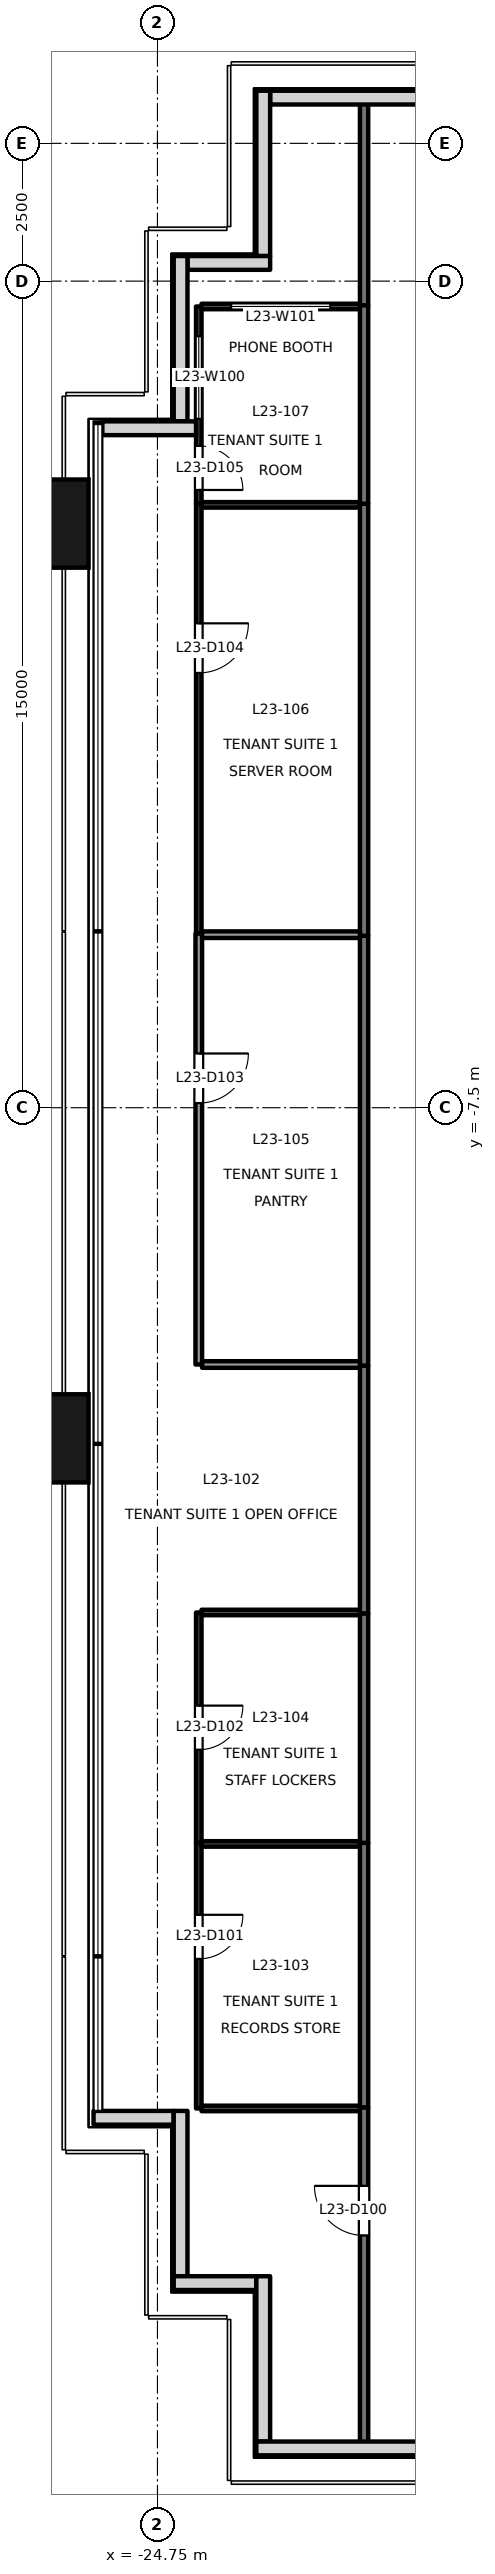
"""IFC4 building model, lengths in metres.
Left out: names, types, materials, properties, quantities, classifications, styles, units other than length and angle.
Written with IfcOpenShell. Run it as: python <this file> out.ifc"""

import sys

from ifc_helpers import new_model, si_unit, direction, frame, frame_2d, origin, origin_2d, place, context, subcontext, project, spatial, rectangle, extrude, element, fill, save


model = new_model("IFC4")
c1 = context("Model", 3, precision=1e-05, world=origin(), true_north=direction((0.0, 1.0)))
c2 = subcontext(c1, "Body", "Model", "MODEL_VIEW")
j1 = project(units=[si_unit("LENGTHUNIT", "METRE"), si_unit("PLANEANGLEUNIT", "RADIAN")], contexts=[c1])
p1 = place(None, origin())
s1 = spatial("IfcSite", under=j1, at=p1, CompositionType="ELEMENT")
p2 = place(p1, origin())
s2 = spatial("IfcBuilding", under=s1, at=p2, CompositionType="ELEMENT")
p3 = place(p2, frame((0.0, 0.0, 103.7)))
s3 = spatial("IfcBuildingStorey", under=s2, at=p3, CompositionType="ELEMENT", Elevation=103.7)
for number, where, z_axis, x_axis in (
    (1, (-26.9, -13.5, -0.2), (0.0, 0.0, 1.0), (0.0, 1.0, 0.0)),
    (2, (-26.9, 3.1, -0.2), (0.0, 0.0, 1.0), (0.0, 1.0, 0.0)),
):
    element("IfcColumn", number, at=place(p3, frame(where, z_axis=z_axis, x_axis=x_axis)), inside=s3, PredefinedType="COLUMN", context=c2, shape_type="SweptSolid", body=[
        extrude(rectangle(XDim=1.6, YDim=1.8, at=origin_2d()), origin(), (0.0, 0.0, 1.0), 4.0),
    ])
p4 = place(p3, frame((-20.0, 10.83, 0.0), z_axis=(0.0, 0.0, 1.0), x_axis=(-1.0, 0.0, 0.0)))
e3 = element("IfcWall", 3, at=p4, inside=s3, PredefinedType="SOLIDWALL", context=c2, shape_type="SweptSolid", body=[
    extrude(rectangle(XDim=2.705, YDim=0.25, at=frame_2d((1.353, 0.0))), origin(), (0.0, 0.0, 1.0), 3.8),
])
p5 = place(p3, frame((-22.83, 10.955, 0.0), z_axis=(0.0, 0.0, 1.0), x_axis=(0.0, -1.0, 0.0)))
e4 = element("IfcWall", 4, at=p5, inside=s3, PredefinedType="SOLIDWALL", context=c2, shape_type="SweptSolid", body=[
    extrude(rectangle(XDim=3.0, YDim=0.25, at=frame_2d((1.5, 0.0))), origin(), (0.0, 0.0, 1.0), 3.8),
])
p6 = place(p3, frame((-22.705, 7.83, 0.0), z_axis=(0.0, 0.0, 1.0), x_axis=(-1.0, 0.0, 0.0)))
e5 = element("IfcWall", 5, at=p6, inside=s3, PredefinedType="SOLIDWALL", context=c2, shape_type="SweptSolid", body=[
    extrude(rectangle(XDim=1.5, YDim=0.25, at=frame_2d((0.75, 0.0))), origin(), (0.0, 0.0, 1.0), 3.8),
])
p7 = place(p3, frame((-24.33, 7.955, 0.0), z_axis=(0.0, 0.0, 1.0), x_axis=(0.0, -1.0, 0.0)))
e6 = element("IfcWall", 6, at=p7, inside=s3, PredefinedType="SOLIDWALL", context=c2, shape_type="SweptSolid", body=[
    extrude(rectangle(XDim=3.0, YDim=0.25, at=frame_2d((1.5, 0.0))), origin(), (0.0, 0.0, 1.0), 3.8),
])
p8 = place(p3, frame((-24.05, 4.83, 0.0), z_axis=(0.0, 0.0, 1.0), x_axis=(-1.0, 0.0, 0.0)))
e7 = element("IfcWall", 7, at=p8, inside=s3, PredefinedType="SOLIDWALL", context=c2, shape_type="SweptSolid", body=[
    extrude(rectangle(XDim=1.7, YDim=0.25, at=frame_2d((0.85, 0.0))), origin(), (0.0, 0.0, 1.0), 3.8),
])
p9 = place(p3, frame((-25.91, -25.83, 0.0), z_axis=(0.0, 0.0, 1.0), x_axis=(1.0, 0.0, 0.0)))
e8 = element("IfcWall", 8, at=p9, inside=s3, PredefinedType="SOLIDWALL", context=c2, shape_type="SweptSolid", body=[
    extrude(rectangle(XDim=1.455, YDim=0.25, at=frame_2d((0.728, 0.0))), origin(), (0.0, 0.0, 1.0), 3.8),
])
p10 = place(p3, frame((-24.33, -25.705, 0.0), z_axis=(0.0, 0.0, 1.0), x_axis=(0.0, -1.0, 0.0)))
e9 = element("IfcWall", 9, at=p10, inside=s3, PredefinedType="SOLIDWALL", context=c2, shape_type="SweptSolid", body=[
    extrude(rectangle(XDim=3.0, YDim=0.25, at=frame_2d((1.5, 0.0))), origin(), (0.0, 0.0, 1.0), 3.8),
])
p11 = place(p3, frame((-24.455, -28.83, 0.0), z_axis=(0.0, 0.0, 1.0), x_axis=(1.0, 0.0, 0.0)))
e10 = element("IfcWall", 10, at=p11, inside=s3, PredefinedType="SOLIDWALL", context=c2, shape_type="SweptSolid", body=[
    extrude(rectangle(XDim=1.5, YDim=0.25, at=frame_2d((0.75, 0.0))), origin(), (0.0, 0.0, 1.0), 3.8),
])
p12 = place(p3, frame((-22.83, -28.705, 0.0), z_axis=(0.0, 0.0, 1.0), x_axis=(0.0, -1.0, 0.0)))
e11 = element("IfcWall", 11, at=p12, inside=s3, PredefinedType="SOLIDWALL", context=c2, shape_type="SweptSolid", body=[
    extrude(rectangle(XDim=3.0, YDim=0.25, at=frame_2d((1.5, 0.0))), origin(), (0.0, 0.0, 1.0), 3.8),
])
p13 = place(p3, frame((-22.955, -31.83, 0.0), z_axis=(0.0, 0.0, 1.0), x_axis=(1.0, 0.0, 0.0)))
e12 = element("IfcWall", 12, at=p13, inside=s3, PredefinedType="SOLIDWALL", context=c2, shape_type="SweptSolid", body=[
    extrude(rectangle(XDim=2.955, YDim=0.25, at=frame_2d((1.478, 0.0))), origin(), (0.0, 0.0, 1.0), 3.8),
])
p14 = place(p3, frame((-21.0, 7.06, 0.0), z_axis=(0.0, 0.0, 1.0), x_axis=(0.0, 1.0, 0.0)))
e13 = element("IfcWall", 13, at=p14, inside=s3, PredefinedType="PARTITIONING", context=c2, shape_type="SweptSolid", body=[
    extrude(rectangle(XDim=3.68, YDim=0.15, at=frame_2d((1.84, 0.0))), origin(), (0.0, 0.0, 1.0), 3.8),
])
p15 = place(p3, frame((-21.0, -31.74, 0.0), z_axis=(0.0, 0.0, 1.0), x_axis=(0.0, 1.0, 0.0)))
e14 = element("IfcWall", 14, at=p15, inside=s3, PredefinedType="PARTITIONING", context=c2, shape_type="SweptSolid", body=[
    extrude(rectangle(XDim=6.1, YDim=0.15, at=frame_2d((3.05, 0.0))), origin(), (0.0, 0.0, 1.0), 3.8),
])
p16 = place(p15, frame((3.775, 0.0, 0.0)))
e15 = element("IfcOpeningElement", 15, at=p16, cuts=e14, PredefinedType="OPENING", context=c2, shape_type="SweptSolid", body=[
    extrude(rectangle(XDim=0.9, YDim=2.1, at=frame_2d((0.45, 1.05))), frame((0.0, 0.085, 0.0), z_axis=(0.0, -1.0, 0.0), x_axis=(1.0, 0.0, 0.0)), (0.0, 0.0, 1.0), 0.171),
])
p17 = place(p3, frame((-21.0, -16.68, 0.0), z_axis=(0.0, 0.0, 1.0), x_axis=(0.0, 1.0, 0.0)))
e16 = element("IfcWall", 16, at=p17, inside=s3, PredefinedType="PARTITIONING", context=c2, shape_type="SweptSolid", body=[
    extrude(rectangle(XDim=4.5, YDim=0.15, at=frame_2d((2.25, 0.0))), origin(), (0.0, 0.0, 1.0), 3.8),
])
p18 = place(p3, frame((-21.0, -25.64, 0.0), z_axis=(0.0, 0.0, 1.0), x_axis=(0.0, 1.0, 0.0)))
e17 = element("IfcWall", 17, at=p18, inside=s3, PredefinedType="PARTITIONING", context=c2, shape_type="SweptSolid", body=[
    extrude(rectangle(XDim=4.8, YDim=0.15, at=frame_2d((2.4, 0.0))), origin(), (0.0, 0.0, 1.0), 3.8),
])
p19 = place(p3, frame((-21.0, -20.84, 0.0), z_axis=(0.0, 0.0, 1.0), x_axis=(0.0, 1.0, 0.0)))
e18 = element("IfcWall", 18, at=p19, inside=s3, PredefinedType="PARTITIONING", context=c2, shape_type="SweptSolid", body=[
    extrude(rectangle(XDim=4.16, YDim=0.15, at=frame_2d((2.08, 0.0))), origin(), (0.0, 0.0, 1.0), 3.8),
])
p20 = place(p3, frame((-21.0, -12.18, 0.0), z_axis=(0.0, 0.0, 1.0), x_axis=(0.0, 1.0, 0.0)))
e19 = element("IfcWall", 19, at=p20, inside=s3, PredefinedType="PARTITIONING", context=c2, shape_type="SweptSolid", body=[
    extrude(rectangle(XDim=7.8, YDim=0.15, at=frame_2d((3.9, 0.0))), origin(), (0.0, 0.0, 1.0), 3.4),
])
p21 = place(p3, frame((-21.0, -4.38, 0.0), z_axis=(0.0, 0.0, 1.0), x_axis=(0.0, 1.0, 0.0)))
e20 = element("IfcWall", 20, at=p21, inside=s3, PredefinedType="PARTITIONING", context=c2, shape_type="SweptSolid", body=[
    extrude(rectangle(XDim=7.84, YDim=0.15, at=frame_2d((3.92, 0.0))), origin(), (0.0, 0.0, 1.0), 3.4),
])
p22 = place(p3, frame((-21.0, 3.46, 0.0), z_axis=(0.0, 0.0, 1.0), x_axis=(0.0, 1.0, 0.0)))
e21 = element("IfcWall", 21, at=p22, inside=s3, PredefinedType="PARTITIONING", context=c2, shape_type="SweptSolid", body=[
    extrude(rectangle(XDim=3.6, YDim=0.15, at=frame_2d((1.8, 0.0))), origin(), (0.0, 0.0, 1.0), 3.4),
])
p23 = place(p3, frame((-24.0, -20.84, 0.0), z_axis=(0.0, 0.0, 1.0), x_axis=(0.0, -1.0, 0.0)))
e22 = element("IfcWall", 22, at=p23, inside=s3, PredefinedType="PARTITIONING", context=c2, shape_type="SweptSolid", body=[
    extrude(rectangle(XDim=4.82, YDim=0.1, at=frame_2d((2.41, 0.0))), origin(), (0.0, 0.0, 1.0), 3.8),
])
p24 = place(p23, frame((1.306, 0.0, 0.0)))
e23 = element("IfcOpeningElement", 23, at=p24, cuts=e22, PredefinedType="OPENING", context=c2, shape_type="SweptSolid", body=[
    extrude(rectangle(XDim=0.8, YDim=2.1, at=frame_2d((0.4, 1.05))), frame((0.0, 0.061, 0.0), z_axis=(0.0, -1.0, 0.0), x_axis=(1.0, 0.0, 0.0)), (0.0, 0.0, 1.0), 0.121),
])
p25 = place(p3, frame((-23.95, -25.66, 0.0), z_axis=(0.0, 0.0, 1.0), x_axis=(1.0, 0.0, 0.0)))
e24 = element("IfcWall", 24, at=p25, inside=s3, PredefinedType="PARTITIONING", context=c2, shape_type="SweptSolid", body=[
    extrude(rectangle(XDim=2.875, YDim=0.1, at=frame_2d((1.438, 0.0))), origin(), (0.0, 0.0, 1.0), 3.8),
])
p26 = place(p3, frame((-24.0, -16.66, 0.0), z_axis=(0.0, 0.0, 1.0), x_axis=(0.0, -1.0, 0.0)))
e25 = element("IfcWall", 25, at=p26, inside=s3, PredefinedType="PARTITIONING", context=c2, shape_type="SweptSolid", body=[
    extrude(rectangle(XDim=4.18, YDim=0.1, at=frame_2d((2.09, 0.0))), origin(), (0.0, 0.0, 1.0), 3.8),
])
p27 = place(p26, frame((1.69, 0.0, 0.0)))
e26 = element("IfcOpeningElement", 26, at=p27, cuts=e25, PredefinedType="OPENING", context=c2, shape_type="SweptSolid", body=[
    extrude(rectangle(XDim=0.8, YDim=2.1, at=frame_2d((0.4, 1.05))), frame((0.0, 0.061, 0.0), z_axis=(0.0, -1.0, 0.0), x_axis=(1.0, 0.0, 0.0)), (0.0, 0.0, 1.0), 0.121),
])
p28 = place(p3, frame((-21.075, -16.66, 0.0), z_axis=(0.0, 0.0, 1.0), x_axis=(-1.0, 0.0, 0.0)))
e27 = element("IfcWall", 27, at=p28, inside=s3, PredefinedType="PARTITIONING", context=c2, shape_type="SweptSolid", body=[
    extrude(rectangle(XDim=2.875, YDim=0.1, at=frame_2d((1.438, 0.0))), origin(), (0.0, 0.0, 1.0), 3.8),
])
p29 = place(p3, frame((-24.0, -4.34, 0.0), z_axis=(0.0, 0.0, 1.0), x_axis=(0.0, -1.0, 0.0)))
e28 = element("IfcWall", 28, at=p29, inside=s3, PredefinedType="PARTITIONING", context=c2, shape_type="SweptSolid", body=[
    extrude(rectangle(XDim=7.82, YDim=0.12, at=frame_2d((3.91, 0.0))), origin(), (0.0, 0.0, 1.0), 3.4),
])
p30 = place(p29, frame((2.176, 0.0, 0.0)))
e29 = element("IfcOpeningElement", 29, at=p30, cuts=e28, PredefinedType="OPENING", context=c2, shape_type="SweptSolid", body=[
    extrude(rectangle(XDim=0.9, YDim=2.1, at=frame_2d((0.45, 1.05))), frame((0.0, 0.071, 0.0), z_axis=(0.0, -1.0, 0.0), x_axis=(1.0, 0.0, 0.0)), (0.0, 0.0, 1.0), 0.141),
])
p31 = place(p3, frame((-23.94, -12.16, 0.0), z_axis=(0.0, 0.0, 1.0), x_axis=(1.0, 0.0, 0.0)))
e30 = element("IfcWall", 30, at=p31, inside=s3, PredefinedType="PARTITIONING", context=c2, shape_type="SweptSolid", body=[
    extrude(rectangle(XDim=2.865, YDim=0.12, at=frame_2d((1.433, 0.0))), origin(), (0.0, 0.0, 1.0), 3.8),
])
p32 = place(p3, frame((-24.0, 3.46, 0.0), z_axis=(0.0, 0.0, 1.0), x_axis=(0.0, -1.0, 0.0)))
e31 = element("IfcWall", 31, at=p32, inside=s3, PredefinedType="PARTITIONING", context=c2, shape_type="SweptSolid", body=[
    extrude(rectangle(XDim=7.8, YDim=0.1, at=frame_2d((3.9, 0.0))), origin(), (0.0, 0.0, 1.0), 3.4),
])
p33 = place(p32, frame((2.17, 0.0, 0.0)))
e32 = element("IfcOpeningElement", 32, at=p33, cuts=e31, PredefinedType="OPENING", context=c2, shape_type="SweptSolid", body=[
    extrude(rectangle(XDim=0.9, YDim=2.1, at=frame_2d((0.45, 1.05))), frame((0.0, 0.061, 0.0), z_axis=(0.0, -1.0, 0.0), x_axis=(1.0, 0.0, 0.0)), (0.0, 0.0, 1.0), 0.121),
])
p34 = place(p3, frame((-24.0, 7.04, 0.0), z_axis=(0.0, 0.0, 1.0), x_axis=(0.0, -1.0, 0.0)))
e33 = element("IfcWall", 33, at=p34, inside=s3, PredefinedType="PARTITIONING", context=c2, shape_type="SweptSolid", body=[
    extrude(rectangle(XDim=3.58, YDim=0.1, at=frame_2d((1.79, 0.0))), origin(), (0.0, 0.0, 1.0), 3.4),
])
p35 = place(p34, frame((2.53, 0.0, 0.0)))
e34 = element("IfcOpeningElement", 34, at=p35, cuts=e33, PredefinedType="OPENING", context=c2, shape_type="SweptSolid", body=[
    extrude(rectangle(XDim=0.8, YDim=2.1, at=frame_2d((0.4, 1.05))), frame((0.0, 0.061, 0.0), z_axis=(0.0, -1.0, 0.0), x_axis=(1.0, 0.0, 0.0)), (0.0, 0.0, 1.0), 0.121),
])
p36 = place(p34, frame((0.54, 0.0, 0.9)))
e35 = element("IfcOpeningElement", 35, at=p36, cuts=e33, PredefinedType="OPENING", context=c2, shape_type="SweptSolid", body=[
    extrude(rectangle(XDim=1.5, YDim=1.2, at=frame_2d((0.75, 0.6))), frame((0.0, 0.061, 0.0), z_axis=(0.0, -1.0, 0.0), x_axis=(1.0, 0.0, 0.0)), (0.0, 0.0, 1.0), 0.121),
])
p37 = place(p3, frame((-21.075, 7.04, 0.0), z_axis=(0.0, 0.0, 1.0), x_axis=(-1.0, 0.0, 0.0)))
e36 = element("IfcWall", 36, at=p37, inside=s3, PredefinedType="PARTITIONING", context=c2, shape_type="SweptSolid", body=[
    extrude(rectangle(XDim=2.875, YDim=0.1, at=frame_2d((1.438, 0.0))), origin(), (0.0, 0.0, 1.0), 3.8),
])
p38 = place(p37, frame((0.537, 0.0, 0.9)))
e37 = element("IfcOpeningElement", 37, at=p38, cuts=e36, PredefinedType="OPENING", context=c2, shape_type="SweptSolid", body=[
    extrude(rectangle(XDim=1.8, YDim=1.2, at=frame_2d((0.9, 0.6))), frame((0.0, 0.061, 0.0), z_axis=(0.0, -1.0, 0.0), x_axis=(1.0, 0.0, 0.0)), (0.0, 0.0, 1.0), 0.121),
])
p39 = place(p3, frame((-23.95, -20.86, 0.0), z_axis=(0.0, 0.0, 1.0), x_axis=(1.0, 0.0, 0.0)))
e38 = element("IfcWall", 38, at=p39, inside=s3, PredefinedType="PARTITIONING", context=c2, shape_type="SweptSolid", body=[
    extrude(rectangle(XDim=2.875, YDim=0.1, at=frame_2d((1.438, 0.0))), origin(), (0.0, 0.0, 1.0), 3.8),
])
p40 = place(p3, frame((-23.94, -4.36, 0.0), z_axis=(0.0, 0.0, 1.0), x_axis=(1.0, 0.0, 0.0)))
e39 = element("IfcWall", 39, at=p40, inside=s3, PredefinedType="PARTITIONING", context=c2, shape_type="SweptSolid", body=[
    extrude(rectangle(XDim=2.865, YDim=0.12, at=frame_2d((1.433, 0.0))), origin(), (0.0, 0.0, 1.0), 3.4),
])
p41 = place(p3, frame((-23.95, 3.44, 0.0), z_axis=(0.0, 0.0, 1.0), x_axis=(1.0, 0.0, 0.0)))
e40 = element("IfcWall", 40, at=p41, inside=s3, PredefinedType="PARTITIONING", context=c2, shape_type="SweptSolid", body=[
    extrude(rectangle(XDim=2.875, YDim=0.1, at=frame_2d((1.438, 0.0))), origin(), (0.0, 0.0, 1.0), 3.8),
])
p42 = place(p16, origin())
e41 = element("IfcDoor", 41, at=p42, inside=s3, OperationType="SINGLE_SWING_RIGHT", PredefinedType="DOOR", context=c2, shape_type="SweptSolid", body=[
    extrude(rectangle(XDim=0.9, YDim=2.1, at=frame_2d((0.45, 1.05))), frame((0.0, 0.025, 0.0), z_axis=(0.0, -1.0, 0.0), x_axis=(1.0, 0.0, 0.0)), (0.0, 0.0, 1.0), 0.05),
])
fill(e15, e41)
p43 = place(p24, origin())
e42 = element("IfcDoor", 42, at=p43, inside=s3, OperationType="SINGLE_SWING_LEFT", PredefinedType="DOOR", context=c2, shape_type="SweptSolid", body=[
    extrude(rectangle(XDim=0.8, YDim=2.1, at=frame_2d((0.4, 1.05))), frame((0.0, 0.025, 0.0), z_axis=(0.0, -1.0, 0.0), x_axis=(1.0, 0.0, 0.0)), (0.0, 0.0, 1.0), 0.05),
])
fill(e23, e42)
p44 = place(p27, origin())
e43 = element("IfcDoor", 43, at=p44, inside=s3, OperationType="SINGLE_SWING_LEFT", PredefinedType="DOOR", context=c2, shape_type="SweptSolid", body=[
    extrude(rectangle(XDim=0.8, YDim=2.1, at=frame_2d((0.4, 1.05))), frame((0.0, 0.025, 0.0), z_axis=(0.0, -1.0, 0.0), x_axis=(1.0, 0.0, 0.0)), (0.0, 0.0, 1.0), 0.05),
])
fill(e26, e43)
p45 = place(p30, origin())
e44 = element("IfcDoor", 44, at=p45, inside=s3, OperationType="SINGLE_SWING_LEFT", PredefinedType="DOOR", context=c2, shape_type="SweptSolid", body=[
    extrude(rectangle(XDim=0.9, YDim=2.1, at=frame_2d((0.45, 1.05))), frame((0.0, 0.025, 0.0), z_axis=(0.0, -1.0, 0.0), x_axis=(1.0, 0.0, 0.0)), (0.0, 0.0, 1.0), 0.05),
])
fill(e29, e44)
p46 = place(p33, origin())
e45 = element("IfcDoor", 45, at=p46, inside=s3, OperationType="SINGLE_SWING_LEFT", PredefinedType="DOOR", context=c2, shape_type="SweptSolid", body=[
    extrude(rectangle(XDim=0.9, YDim=2.1, at=frame_2d((0.45, 1.05))), frame((0.0, 0.025, 0.0), z_axis=(0.0, -1.0, 0.0), x_axis=(1.0, 0.0, 0.0)), (0.0, 0.0, 1.0), 0.05),
])
fill(e32, e45)
p47 = place(p35, origin())
e46 = element("IfcDoor", 46, at=p47, inside=s3, OperationType="SINGLE_SWING_RIGHT", PredefinedType="DOOR", context=c2, shape_type="SweptSolid", body=[
    extrude(rectangle(XDim=0.8, YDim=2.1, at=frame_2d((0.4, 1.05))), frame((0.0, 0.025, 0.0), z_axis=(0.0, -1.0, 0.0), x_axis=(1.0, 0.0, 0.0)), (0.0, 0.0, 1.0), 0.05),
])
fill(e34, e46)
p48 = place(p36, origin())
e47 = element("IfcWindow", 47, at=p48, inside=s3, PartitioningType="SINGLE_PANEL", PredefinedType="WINDOW", context=c2, shape_type="SweptSolid", body=[
    extrude(rectangle(XDim=1.5, YDim=1.2, at=frame_2d((0.75, 0.6))), frame((0.0, 0.03, 0.0), z_axis=(0.0, -1.0, 0.0), x_axis=(1.0, 0.0, 0.0)), (0.0, 0.0, 1.0), 0.06),
])
fill(e35, e47)
p49 = place(p38, origin())
e48 = element("IfcWindow", 48, at=p49, inside=s3, PartitioningType="SINGLE_PANEL", PredefinedType="WINDOW", context=c2, shape_type="SweptSolid", body=[
    extrude(rectangle(XDim=1.8, YDim=1.2, at=frame_2d((0.9, 0.6))), frame((0.0, 0.03, 0.0), z_axis=(0.0, -1.0, 0.0), x_axis=(1.0, 0.0, 0.0)), (0.0, 0.0, 1.0), 0.06),
])
fill(e37, e48)
save(model, sys.argv[1])
